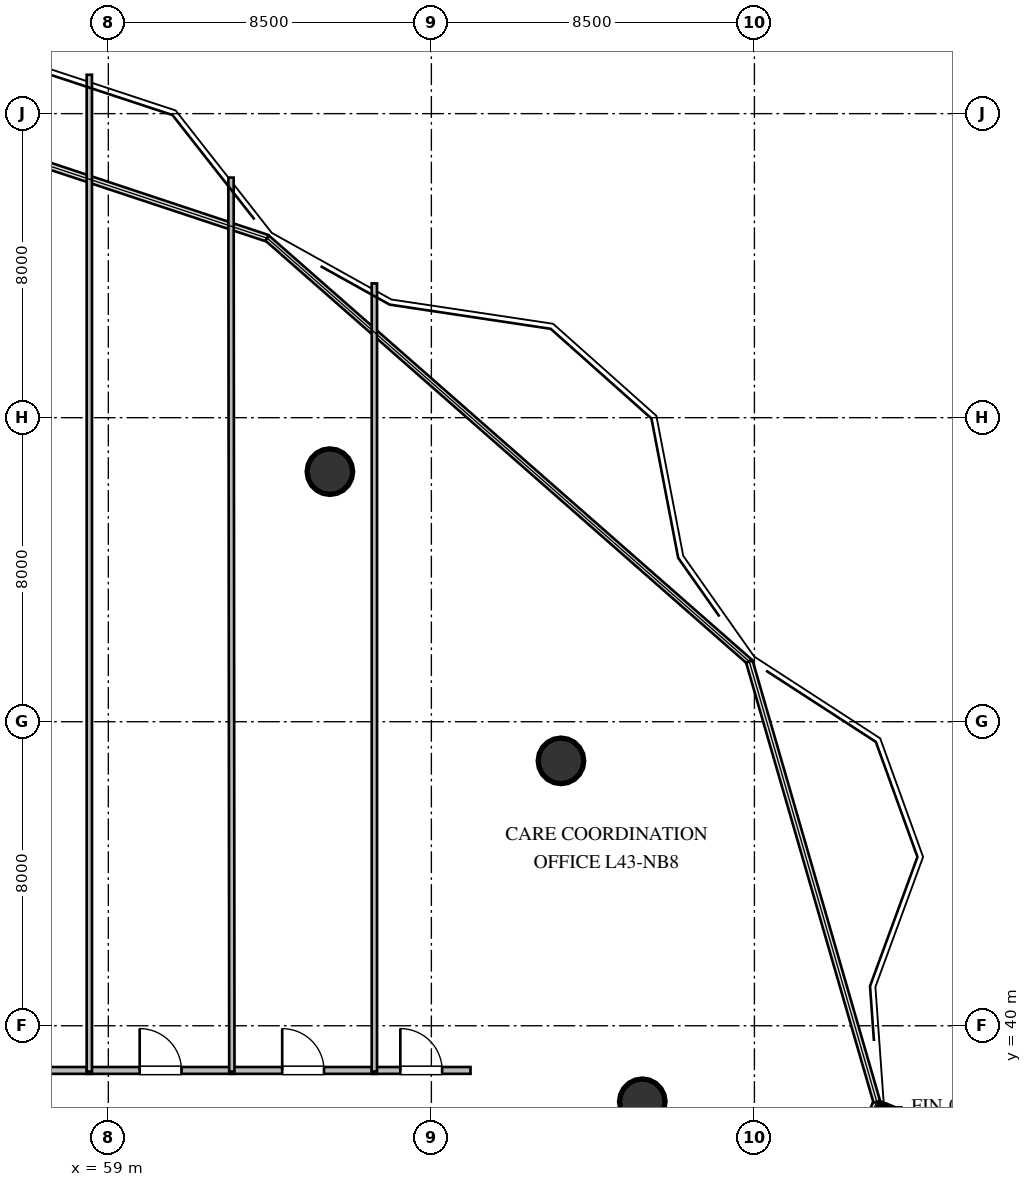
"""IFC4 building model, lengths in metres.
Left out: names, types, materials, properties, quantities, classifications, styles, units other than length and angle.
Written with IfcOpenShell. Run it as: python <this file> out.ifc"""

import sys

from ifc_helpers import new_model, si_unit, direction, frame, frame_2d, origin, origin_2d, place, context, subcontext, project, spatial, rectangle, circle, extrude, element, fill, save


model = new_model("IFC4")
c1 = context("Model", 3, precision=1e-05, world=origin(), true_north=direction((0.0, 1.0)))
c2 = subcontext(c1, "Body", "Model", "MODEL_VIEW")
j1 = project(units=[si_unit("LENGTHUNIT", "METRE"), si_unit("PLANEANGLEUNIT", "RADIAN")], contexts=[c1])
p1 = place(None, origin())
s1 = spatial("IfcSite", under=j1, at=p1, CompositionType="ELEMENT")
p2 = place(p1, origin())
s2 = spatial("IfcBuilding", under=s1, at=p2, CompositionType="ELEMENT")
p3 = place(p2, frame((0.0, 0.0, 163.8)))
s3 = spatial("IfcBuildingStorey", under=s2, at=p3, CompositionType="ELEMENT", Elevation=163.8)
for number, where, z_axis, x_axis in (
    (1, (73.05, 38.0, 0.0), (0.0, 0.0, 1.0), (1.0, 0.0, 0.0)),
    (2, (70.91, 46.97, 0.0), (0.0, 0.0, 1.0), (1.0, 0.0, 0.0)),
    (3, (64.83, 54.58, 0.0), (0.0, 0.0, 1.0), (1.0, 0.0, 0.0)),
):
    element("IfcColumn", number, at=place(p3, frame(where, z_axis=z_axis, x_axis=x_axis)), inside=s3, PredefinedType="COLUMN", context=c2, shape_type="SweptSolid", body=[
        extrude(circle(Radius=0.6, at=origin_2d()), origin(), (0.0, 0.0, 1.0), 3.6),
    ])
p4 = place(p3, frame((54.185, 38.825, 0.0), z_axis=(0.0, 0.0, 1.0), x_axis=(1.0, 0.0, 0.0)))
e4 = element("IfcWall", 4, at=p4, inside=s3, PredefinedType="PARTITIONING", context=c2, shape_type="SweptSolid", body=[
    extrude(rectangle(XDim=4.38, YDim=0.18, at=frame_2d((2.19, 0.0))), origin(), (0.0, 0.0, 1.0), 3.36),
])
p5 = place(p4, frame((1.64, 0.0, 0.0)))
e5 = element("IfcOpeningElement", 5, at=p5, cuts=e4, PredefinedType="OPENING", context=c2, shape_type="SweptSolid", body=[
    extrude(rectangle(XDim=1.1, YDim=2.1, at=frame_2d((0.55, 1.05))), frame((0.0, 0.1, 0.0), z_axis=(0.0, -1.0, 0.0), x_axis=(1.0, 0.0, 0.0)), (0.0, 0.0, 1.0), 0.2),
])
p6 = place(p3, frame((58.435, 38.825, 0.0), z_axis=(0.0, 0.0, 1.0), x_axis=(1.0, 0.0, 0.0)))
e6 = element("IfcWall", 6, at=p6, inside=s3, PredefinedType="PARTITIONING", context=c2, shape_type="SweptSolid", body=[
    extrude(rectangle(XDim=3.88, YDim=0.18, at=frame_2d((1.94, 0.0))), origin(), (0.0, 0.0, 1.0), 3.36),
])
p7 = place(p6, frame((1.39, 0.0, 0.0)))
e7 = element("IfcOpeningElement", 7, at=p7, cuts=e6, PredefinedType="OPENING", context=c2, shape_type="SweptSolid", body=[
    extrude(rectangle(XDim=1.1, YDim=2.1, at=frame_2d((0.55, 1.05))), frame((0.0, 0.1, 0.0), z_axis=(0.0, -1.0, 0.0), x_axis=(1.0, 0.0, 0.0)), (0.0, 0.0, 1.0), 0.2),
])
p8 = place(p3, frame((62.185, 38.825, 0.0), z_axis=(0.0, 0.0, 1.0), x_axis=(1.0, 0.0, 0.0)))
e8 = element("IfcWall", 8, at=p8, inside=s3, PredefinedType="PARTITIONING", context=c2, shape_type="SweptSolid", body=[
    extrude(rectangle(XDim=3.88, YDim=0.18, at=frame_2d((1.94, 0.0))), origin(), (0.0, 0.0, 1.0), 3.36),
])
p9 = place(p8, frame((1.39, 0.0, 0.0)))
e9 = element("IfcOpeningElement", 9, at=p9, cuts=e8, PredefinedType="OPENING", context=c2, shape_type="SweptSolid", body=[
    extrude(rectangle(XDim=1.1, YDim=2.1, at=frame_2d((0.55, 1.05))), frame((0.0, 0.1, 0.0), z_axis=(0.0, -1.0, 0.0), x_axis=(1.0, 0.0, 0.0)), (0.0, 0.0, 1.0), 0.2),
])
p10 = place(p3, frame((65.935, 38.825, 0.0), z_axis=(0.0, 0.0, 1.0), x_axis=(1.0, 0.0, 0.0)))
e10 = element("IfcWall", 10, at=p10, inside=s3, PredefinedType="PARTITIONING", context=c2, shape_type="SweptSolid", body=[
    extrude(rectangle(XDim=2.595, YDim=0.18, at=frame_2d((1.297, 0.0))), origin(), (0.0, 0.0, 1.0), 3.36),
])
p11 = place(p10, frame((0.748, 0.0, 0.0)))
e11 = element("IfcOpeningElement", 11, at=p11, cuts=e10, PredefinedType="OPENING", context=c2, shape_type="SweptSolid", body=[
    extrude(rectangle(XDim=1.1, YDim=2.1, at=frame_2d((0.55, 1.05))), frame((0.0, 0.1, 0.0), z_axis=(0.0, -1.0, 0.0), x_axis=(1.0, 0.0, 0.0)), (0.0, 0.0, 1.0), 0.2),
])
p12 = place(p3, frame((58.5, 65.023, 0.0), z_axis=(0.0, 0.0, 1.0), x_axis=(0.0, -1.0, 0.0)))
e12 = element("IfcWall", 12, at=p12, inside=s3, PredefinedType="PARTITIONING", context=c2, shape_type="SweptSolid", body=[
    extrude(rectangle(XDim=26.228, YDim=0.14, at=frame_2d((13.114, 0.0))), origin(), (0.0, 0.0, 1.0), 2.996),
])
p13 = place(p3, frame((62.228, 62.317, 0.0), z_axis=(0.0, 0.0, 1.0), x_axis=(0.000934132821, -0.999999563698, 0.0)))
e13 = element("IfcWall", 13, at=p13, inside=s3, PredefinedType="PARTITIONING", context=c2, shape_type="SweptSolid", body=[
    extrude(rectangle(XDim=23.522, YDim=0.14, at=frame_2d((11.761, 0.0))), origin(), (0.0, 0.0, 1.0), 3.36),
])
p14 = place(p3, frame((66.0, 59.533, 0.0), z_axis=(0.0, 0.0, 1.0), x_axis=(0.0, -1.0, 0.0)))
e14 = element("IfcWall", 14, at=p14, inside=s3, PredefinedType="PARTITIONING", context=c2, shape_type="SweptSolid", body=[
    extrude(rectangle(XDim=20.738, YDim=0.14, at=frame_2d((10.369, 0.0))), origin(), (0.0, 0.0, 1.0), 3.36),
])
p15 = place(p7, origin())
e15 = element("IfcDoor", 15, at=p15, inside=s3, OperationType="SINGLE_SWING_LEFT", PredefinedType="DOOR", context=c2, shape_type="SweptSolid", body=[
    extrude(rectangle(XDim=1.1, YDim=2.1, at=frame_2d((0.55, 1.05))), frame((0.0, 0.025, 0.0), z_axis=(0.0, -1.0, 0.0), x_axis=(1.0, 0.0, 0.0)), (0.0, 0.0, 1.0), 0.05),
])
fill(e7, e15)
p16 = place(p9, origin())
e16 = element("IfcDoor", 16, at=p16, inside=s3, OperationType="SINGLE_SWING_LEFT", PredefinedType="DOOR", context=c2, shape_type="SweptSolid", body=[
    extrude(rectangle(XDim=1.1, YDim=2.1, at=frame_2d((0.55, 1.05))), frame((0.0, 0.025, 0.0), z_axis=(0.0, -1.0, 0.0), x_axis=(1.0, 0.0, 0.0)), (0.0, 0.0, 1.0), 0.05),
])
fill(e9, e16)
p17 = place(p11, origin())
e17 = element("IfcDoor", 17, at=p17, inside=s3, OperationType="SINGLE_SWING_LEFT", PredefinedType="DOOR", context=c2, shape_type="SweptSolid", body=[
    extrude(rectangle(XDim=1.1, YDim=2.1, at=frame_2d((0.55, 1.05))), frame((0.0, 0.025, 0.0), z_axis=(0.0, -1.0, 0.0), x_axis=(1.0, 0.0, 0.0)), (0.0, 0.0, 1.0), 0.05),
])
fill(e11, e17)
save(model, sys.argv[1])
